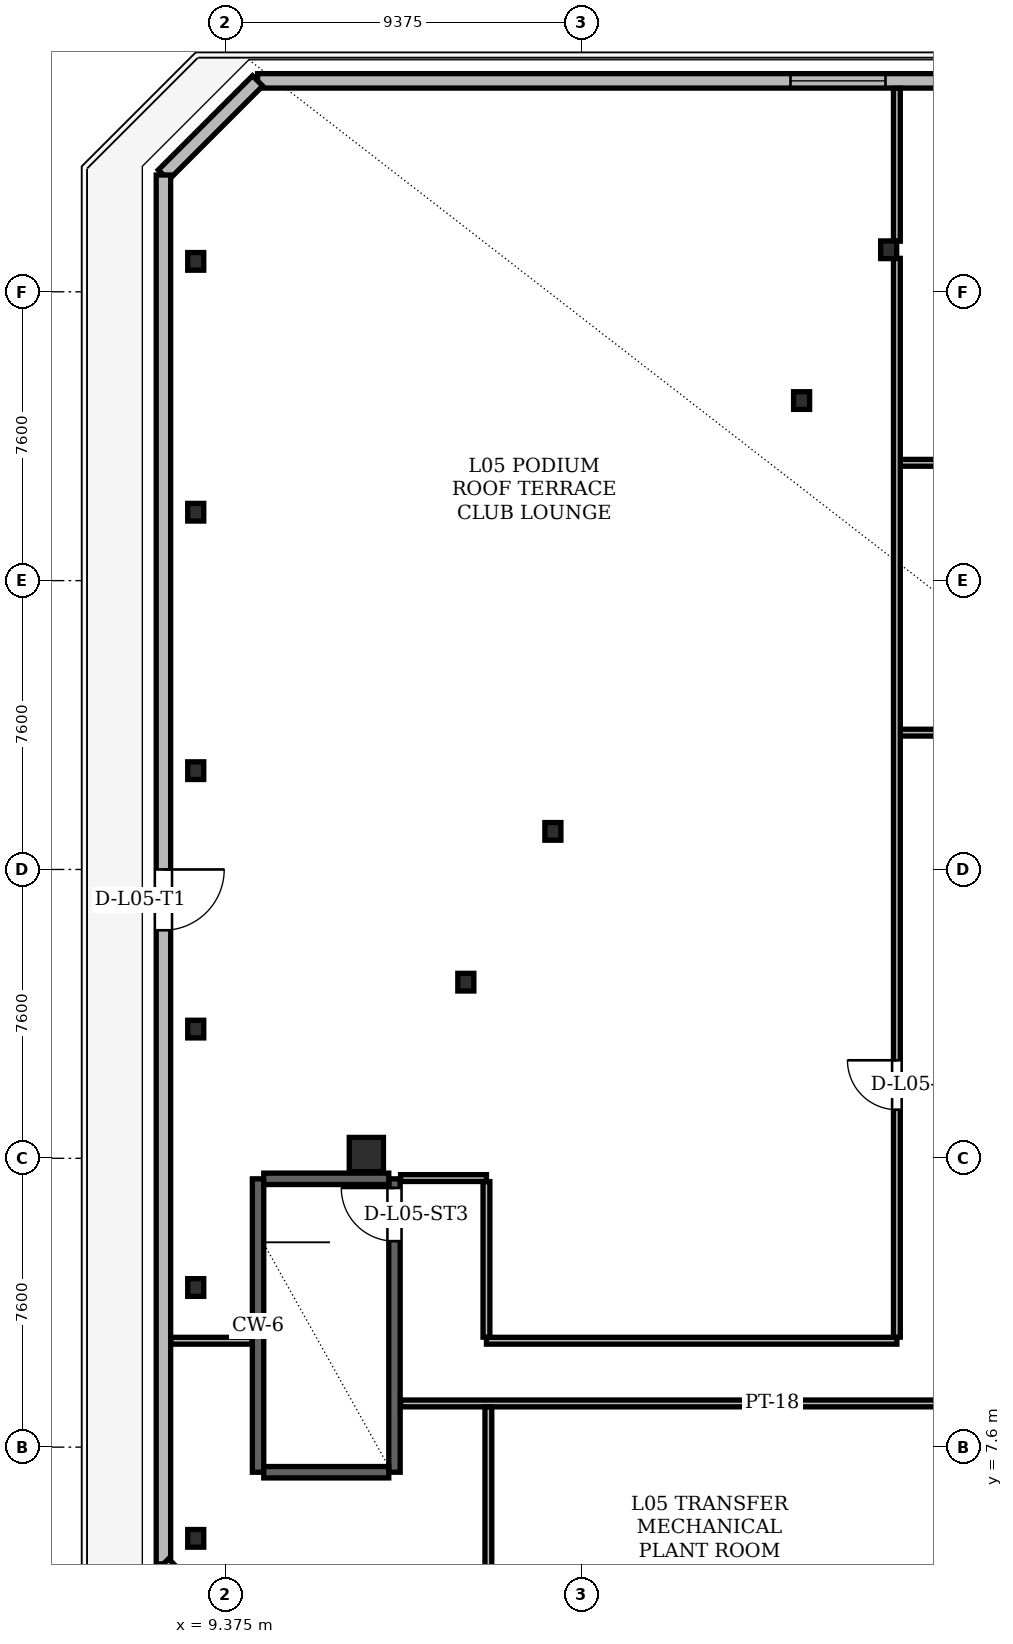
"""IFC4 building model, lengths in metres.
Left out: names, types, materials, properties, quantities, classifications, styles, units other than length and angle.
Written with IfcOpenShell. Run it as: python <this file> out.ifc"""

import sys

from ifc_helpers import new_model, si_unit, direction, frame, frame_2d, origin, origin_2d, place, context, subcontext, project, spatial, rectangle, hollow_rectangle, i_section, extrude, element, fill, save


model = new_model("IFC4")
c1 = context("Model", 3, precision=1e-05, world=origin(), true_north=direction((0.0, 1.0)))
c2 = subcontext(c1, "Body", "Model", "MODEL_VIEW")
j1 = project(units=[si_unit("LENGTHUNIT", "METRE"), si_unit("PLANEANGLEUNIT", "RADIAN")], contexts=[c1])
p1 = place(None, origin())
s1 = spatial("IfcSite", under=j1, at=p1, CompositionType="ELEMENT")
p2 = place(p1, origin())
s2 = spatial("IfcBuilding", under=s1, at=p2, CompositionType="ELEMENT")
p3 = place(p2, frame((0.0, 0.0, 22.5)))
s3 = spatial("IfcBuildingStorey", under=s2, at=p3, CompositionType="ELEMENT", Elevation=22.5)
p4 = place(p3, frame((13.09, 15.3, 0.004), z_axis=(0.0, 0.0, 1.0), x_axis=(1.0, 0.0, 0.0)))
e1 = element("IfcColumn", 1, at=p4, inside=s3, PredefinedType="COLUMN", context=c2, shape_type="SweptSolid", body=[
    extrude(hollow_rectangle(XDim=0.9, YDim=0.9, WallThickness=0.075, at=origin_2d()), origin(), (0.0, 0.0, 1.0), 4.786),
])
for number, where, z_axis, x_axis in (
    (2, (26.834, 39.106, 0.004), (0.0, 0.0, 1.0), (1.0, 0.0, 0.0)),
    (3, (24.543, 35.138, 0.004), (0.0, 0.0, 1.0), (1.0, 0.0, 0.0)),
    (4, (17.998, 23.802, 0.004), (0.0, 0.0, 1.0), (1.0, 0.0, 0.0)),
    (5, (15.708, 19.834, 0.004), (0.0, 0.0, 1.0), (1.0, 0.0, 0.0)),
):
    element("IfcColumn", number, at=place(p3, frame(where, z_axis=z_axis, x_axis=x_axis)), inside=s3, PredefinedType="COLUMN", context=c2, shape_type="SweptSolid", body=[
        extrude(i_section(OverallWidth=0.422, OverallDepth=0.465, WebThickness=0.045, FlangeThickness=0.072, at=origin_2d()), origin(), (0.0, 0.0, 1.0), 4.791),
    ])
for number, where, z_axis, x_axis in (
    (6, (8.6, 5.2, 0.0), (0.0, 0.0, 1.0), (1.0, 0.0, 0.0)),
    (7, (8.6, 11.8, 0.0), (0.0, 0.0, 1.0), (1.0, 0.0, 0.0)),
    (8, (8.6, 18.6, 0.0), (0.0, 0.0, 1.0), (1.0, 0.0, 0.0)),
    (9, (8.6, 25.4, 0.0), (0.0, 0.0, 1.0), (1.0, 0.0, 0.0)),
    (10, (8.6, 32.2, 0.0), (0.0, 0.0, 1.0), (1.0, 0.0, 0.0)),
    (11, (8.6, 38.8, 0.0), (0.0, 0.0, 1.0), (1.0, 0.0, 0.0)),
):
    element("IfcColumn", number, at=place(p3, frame(where, z_axis=z_axis, x_axis=x_axis)), inside=s3, PredefinedType="COLUMN", context=c2, shape_type="SweptSolid", body=[
        extrude(i_section(OverallWidth=0.422, OverallDepth=0.465, WebThickness=0.045, FlangeThickness=0.072, at=origin_2d()), origin(), (0.0, 0.0, 1.0), 4.8),
    ])
p5 = place(p3, frame((10.24, 6.94, 0.0), z_axis=(0.0, 0.0, 1.0), x_axis=(0.0, 1.0, 0.0)))
e12 = element("IfcWall", 12, at=p5, inside=s3, PredefinedType="SHEAR", context=c2, shape_type="SweptSolid", body=[
    extrude(rectangle(XDim=7.72, YDim=0.3, at=frame_2d((3.86, 0.0))), origin(), (0.0, 0.0, 1.0), 4.56),
])
p6 = place(p3, frame((13.83, 6.94, 0.0), z_axis=(0.0, 0.0, 1.0), x_axis=(0.0, 1.0, 0.0)))
e13 = element("IfcWall", 13, at=p6, inside=s3, PredefinedType="SHEAR", context=c2, shape_type="SweptSolid", body=[
    extrude(rectangle(XDim=7.72, YDim=0.3, at=frame_2d((3.86, 0.0))), origin(), (0.0, 0.0, 1.0), 4.56),
])
p7 = place(p6, frame((6.08, 0.0, 0.0)))
e14 = element("IfcOpeningElement", 14, at=p7, cuts=e13, PredefinedType="OPENING", context=c2, shape_type="SweptSolid", body=[
    extrude(rectangle(XDim=1.4, YDim=2.2, at=frame_2d((0.7, 1.1))), frame((0.0, 0.15, 0.0), z_axis=(0.0, -1.0, 0.0), x_axis=(1.0, 0.0, 0.0)), (0.0, 0.0, 1.0), 0.3),
])
for number, where, z_axis, x_axis in (
    (15, (10.39, 6.94, 0.0), (0.0, 0.0, 1.0), (1.0, 0.0, 0.0)),
    (16, (10.39, 14.66, 0.0), (0.0, 0.0, 1.0), (1.0, 0.0, 0.0)),
):
    element("IfcWall", number, at=place(p3, frame(where, z_axis=z_axis, x_axis=x_axis)), inside=s3, PredefinedType="SHEAR", context=c2, shape_type="SweptSolid", body=[
        extrude(rectangle(XDim=3.29, YDim=0.3, at=frame_2d((1.645, 0.0))), origin(), (0.0, 0.0, 1.0), 4.56),
    ])
p8 = place(p3, frame((64.772, 43.55, 0.0), z_axis=(0.0, 0.0, 1.0), x_axis=(-1.0, 0.0, 0.0)))
e17 = element("IfcWall", 17, at=p8, inside=s3, PredefinedType="SOLIDWALL", context=c2, shape_type="SweptSolid", body=[
    extrude(rectangle(XDim=54.544, YDim=0.38, at=frame_2d((27.272, 0.0))), origin(), (0.0, 0.0, 1.0), 3.35),
])
p9 = place(p8, frame((14.022, 0.0, 0.85)))
e18 = element("IfcOpeningElement", 18, at=p9, cuts=e17, PredefinedType="OPENING", context=c2, shape_type="SweptSolid", body=[
    extrude(rectangle(XDim=2.5, YDim=2.15, at=frame_2d((1.25, 1.075))), frame((0.0, 0.19, 0.0), z_axis=(0.0, -1.0, 0.0), x_axis=(1.0, 0.0, 0.0)), (0.0, 0.0, 1.0), 0.38),
])
p10 = place(p8, frame((38.022, 0.0, 0.85)))
e19 = element("IfcOpeningElement", 19, at=p10, cuts=e17, PredefinedType="OPENING", context=c2, shape_type="SweptSolid", body=[
    extrude(rectangle(XDim=2.5, YDim=2.15, at=frame_2d((1.25, 1.075))), frame((0.0, 0.19, 0.0), z_axis=(0.0, -1.0, 0.0), x_axis=(1.0, 0.0, 0.0)), (0.0, 0.0, 1.0), 0.38),
])
p11 = place(p3, frame((10.228, 43.55, 0.0), z_axis=(0.0, 0.0, 1.0), x_axis=(-0.707106781187, -0.707106781187, 0.0)))
e20 = element("IfcWall", 20, at=p11, inside=s3, PredefinedType="SOLIDWALL", context=c2, shape_type="SweptSolid", body=[
    extrude(rectangle(XDim=3.504, YDim=0.38, at=frame_2d((1.752, 0.0))), origin(), (0.0, 0.0, 1.0), 4.56),
])
p12 = place(p3, frame((7.75, 41.072, 0.0), z_axis=(0.0, 0.0, 1.0), x_axis=(0.0, -1.0, 0.0)))
e21 = element("IfcWall", 21, at=p12, inside=s3, PredefinedType="SOLIDWALL", context=c2, shape_type="SweptSolid", body=[
    extrude(rectangle(XDim=36.544, YDim=0.38, at=frame_2d((18.272, 0.0))), origin(), (0.0, 0.0, 1.0), 4.56),
])
p13 = place(p12, frame((18.272, 0.0, 0.0)))
e22 = element("IfcOpeningElement", 22, at=p13, cuts=e21, PredefinedType="OPENING", context=c2, shape_type="SweptSolid", body=[
    extrude(rectangle(XDim=1.6, YDim=2.2, at=frame_2d((0.8, 1.1))), frame((0.0, 0.19, 0.0), z_axis=(0.0, -1.0, 0.0), x_axis=(1.0, 0.0, 0.0)), (0.0, 0.0, 1.0), 0.38),
])
p14 = place(p3, frame((7.75, 4.528, 0.0), z_axis=(0.0, 0.0, 1.0), x_axis=(0.707106781187, -0.707106781187, 0.0)))
e23 = element("IfcWall", 23, at=p14, inside=s3, PredefinedType="SOLIDWALL", context=c2, shape_type="SweptSolid", body=[
    extrude(rectangle(XDim=3.504, YDim=0.38, at=frame_2d((1.752, 0.0))), origin(), (0.0, 0.0, 1.0), 4.56),
])
p15 = place(p3, frame((13.99, 8.75, 0.0), z_axis=(0.0, 0.0, 1.0), x_axis=(1.0, 0.0, 0.0)))
e24 = element("IfcWall", 24, at=p15, inside=s3, PredefinedType="PARTITIONING", context=c2, shape_type="SweptSolid", body=[
    extrude(rectangle(XDim=41.61, YDim=0.18, at=frame_2d((20.805, 0.0))), origin(), (0.0, 0.0, 1.0), 3.35),
])
p16 = place(p15, frame((21.209, 0.0, 0.0)))
e25 = element("IfcOpeningElement", 25, at=p16, cuts=e24, PredefinedType="OPENING", context=c2, shape_type="SweptSolid", body=[
    extrude(rectangle(XDim=1.45, YDim=2.25, at=frame_2d((0.725, 1.125))), frame((0.0, 0.09, 0.0), z_axis=(0.0, -1.0, 0.0), x_axis=(1.0, 0.0, 0.0)), (0.0, 0.0, 1.0), 0.18),
])
p17 = place(p3, frame((7.944, 10.4, 0.0), z_axis=(0.0, 0.0, 1.0), x_axis=(1.0, 0.0, 0.0)))
e26 = element("IfcWall", 26, at=p17, inside=s3, PredefinedType="PARTITIONING", context=c2, shape_type="SweptSolid", body=[
    extrude(rectangle(XDim=2.136, YDim=0.18, at=frame_2d((1.068, 0.0))), origin(), (0.0, 0.0, 1.0), 3.623),
])
p18 = place(p3, frame((16.25, 10.4, 0.0), z_axis=(0.0, 0.0, 1.0), x_axis=(1.0, 0.0, 0.0)))
e27 = element("IfcWall", 27, at=p18, inside=s3, PredefinedType="PARTITIONING", context=c2, shape_type="SweptSolid", body=[
    extrude(rectangle(XDim=10.8, YDim=0.18, at=frame_2d((5.4, 0.0))), origin(), (0.0, 0.0, 1.0), 4.56),
])
p19 = place(p3, frame((13.99, 14.68, 0.0), z_axis=(0.0, 0.0, 1.0), x_axis=(1.0, 0.0, 0.0)))
e28 = element("IfcWall", 28, at=p19, inside=s3, PredefinedType="PARTITIONING", context=c2, shape_type="SweptSolid", body=[
    extrude(rectangle(XDim=2.26, YDim=0.18, at=frame_2d((1.13, 0.0))), origin(), (0.0, 0.0, 1.0), 3.623),
])
p20 = place(p3, frame((27.05, 26.4, 0.0), z_axis=(0.0, 0.0, 1.0), x_axis=(1.0, 0.0, 0.0)))
e29 = element("IfcWall", 29, at=p20, inside=s3, PredefinedType="PARTITIONING", context=c2, shape_type="SweptSolid", body=[
    extrude(rectangle(XDim=28.55, YDim=0.18, at=frame_2d((14.275, 0.0))), origin(), (0.0, 0.0, 1.0), 3.35),
])
p21 = place(p20, frame((2.885, 0.0, 0.0)))
e30 = element("IfcOpeningElement", 30, at=p21, cuts=e29, PredefinedType="OPENING", context=c2, shape_type="SweptSolid", body=[
    extrude(rectangle(XDim=0.88, YDim=2.08, at=frame_2d((0.44, 1.04))), frame((0.0, 0.09, 0.0), z_axis=(0.0, -1.0, 0.0), x_axis=(1.0, 0.0, 0.0)), (0.0, 0.0, 1.0), 0.18),
])
p22 = place(p20, frame((8.36, 0.0, 0.0)))
e31 = element("IfcOpeningElement", 31, at=p22, cuts=e29, PredefinedType="OPENING", context=c2, shape_type="SweptSolid", body=[
    extrude(rectangle(XDim=0.88, YDim=2.08, at=frame_2d((0.44, 1.04))), frame((0.0, 0.09, 0.0), z_axis=(0.0, -1.0, 0.0), x_axis=(1.0, 0.0, 0.0)), (0.0, 0.0, 1.0), 0.18),
])
p23 = place(p3, frame((27.05, 33.5, 0.0), z_axis=(0.0, 0.0, 1.0), x_axis=(1.0, 0.0, 0.0)))
e32 = element("IfcWall", 32, at=p23, inside=s3, PredefinedType="PARTITIONING", context=c2, shape_type="SweptSolid", body=[
    extrude(rectangle(XDim=6.45, YDim=0.18, at=frame_2d((3.225, 0.0))), origin(), (0.0, 0.0, 1.0), 3.623),
])
p24 = place(p3, frame((16.25, 10.494, 0.0), z_axis=(0.0, 0.0, 1.0), x_axis=(0.0, 1.0, 0.0)))
e33 = element("IfcWall", 33, at=p24, inside=s3, PredefinedType="PARTITIONING", context=c2, shape_type="SweptSolid", body=[
    extrude(rectangle(XDim=4.092, YDim=0.18, at=frame_2d((2.046, 0.0))), origin(), (0.0, 0.0, 1.0), 3.35),
])
p25 = place(p3, frame((16.3, 2.244, 0.0), z_axis=(0.0, 0.0, 1.0), x_axis=(0.0, 1.0, 0.0)))
e34 = element("IfcWall", 34, at=p25, inside=s3, PredefinedType="PARTITIONING", context=c2, shape_type="SweptSolid", body=[
    extrude(rectangle(XDim=6.412, YDim=0.18, at=frame_2d((3.206, 0.0))), origin(), (0.0, 0.0, 1.0), 4.56),
])
p26 = place(p3, frame((27.05, 10.494, 0.0), z_axis=(0.0, 0.0, 1.0), x_axis=(0.0, 1.0, 0.0)))
e35 = element("IfcWall", 35, at=p26, inside=s3, PredefinedType="PARTITIONING", context=c2, shape_type="SweptSolid", body=[
    extrude(rectangle(XDim=28.386, YDim=0.18, at=frame_2d((14.193, 0.0))), origin(), (0.0, 0.0, 1.0), 3.35),
])
p27 = place(p26, frame((5.985, 0.0, 0.0)))
e36 = element("IfcOpeningElement", 36, at=p27, cuts=e35, PredefinedType="OPENING", context=c2, shape_type="SweptSolid", body=[
    extrude(rectangle(XDim=1.3, YDim=2.2, at=frame_2d((0.65, 1.1))), frame((0.0, 0.09, 0.0), z_axis=(0.0, -1.0, 0.0), x_axis=(1.0, 0.0, 0.0)), (0.0, 0.0, 1.0), 0.18),
])
p28 = place(p3, frame((27.05, 39.332, 0.0), z_axis=(0.0, 0.0, 1.0), x_axis=(0.0, 1.0, 0.0)))
e37 = element("IfcWall", 37, at=p28, inside=s3, PredefinedType="PARTITIONING", context=c2, shape_type="SweptSolid", body=[
    extrude(rectangle(XDim=4.024, YDim=0.18, at=frame_2d((2.012, 0.0))), origin(), (0.0, 0.0, 1.0), 3.35),
])
p29 = place(p10, origin())
e38 = element("IfcWindow", 38, at=p29, inside=s3, PartitioningType="SINGLE_PANEL", PredefinedType="WINDOW", context=c2, shape_type="SweptSolid", body=[
    extrude(rectangle(XDim=2.5, YDim=2.15, at=frame_2d((1.25, 1.075))), frame((0.0, 0.03, 0.0), z_axis=(0.0, -1.0, 0.0), x_axis=(1.0, 0.0, 0.0)), (0.0, 0.0, 1.0), 0.06),
])
fill(e19, e38)
p30 = place(p13, origin())
e39 = element("IfcDoor", 39, at=p30, inside=s3, OperationType="SINGLE_SWING_LEFT", PredefinedType="DOOR", context=c2, shape_type="SweptSolid", body=[
    extrude(rectangle(XDim=1.6, YDim=2.2, at=frame_2d((0.8, 1.1))), frame((0.0, 0.025, 0.0), z_axis=(0.0, -1.0, 0.0), x_axis=(1.0, 0.0, 0.0)), (0.0, 0.0, 1.0), 0.05),
])
fill(e22, e39)
p31 = place(p7, origin())
e40 = element("IfcDoor", 40, at=p31, inside=s3, OperationType="SINGLE_SWING_RIGHT", PredefinedType="DOOR", context=c2, shape_type="SweptSolid", body=[
    extrude(rectangle(XDim=1.4, YDim=2.2, at=frame_2d((0.7, 1.1))), frame((0.0, 0.025, 0.0), z_axis=(0.0, -1.0, 0.0), x_axis=(1.0, 0.0, 0.0)), (0.0, 0.0, 1.0), 0.05),
])
fill(e14, e40)
p32 = place(p27, origin())
e41 = element("IfcDoor", 41, at=p32, inside=s3, OperationType="SINGLE_SWING_RIGHT", PredefinedType="DOOR", context=c2, shape_type="SweptSolid", body=[
    extrude(rectangle(XDim=1.3, YDim=2.2, at=frame_2d((0.65, 1.1))), frame((0.0, 0.025, 0.0), z_axis=(0.0, -1.0, 0.0), x_axis=(1.0, 0.0, 0.0)), (0.0, 0.0, 1.0), 0.05),
])
fill(e36, e41)
save(model, sys.argv[1])
